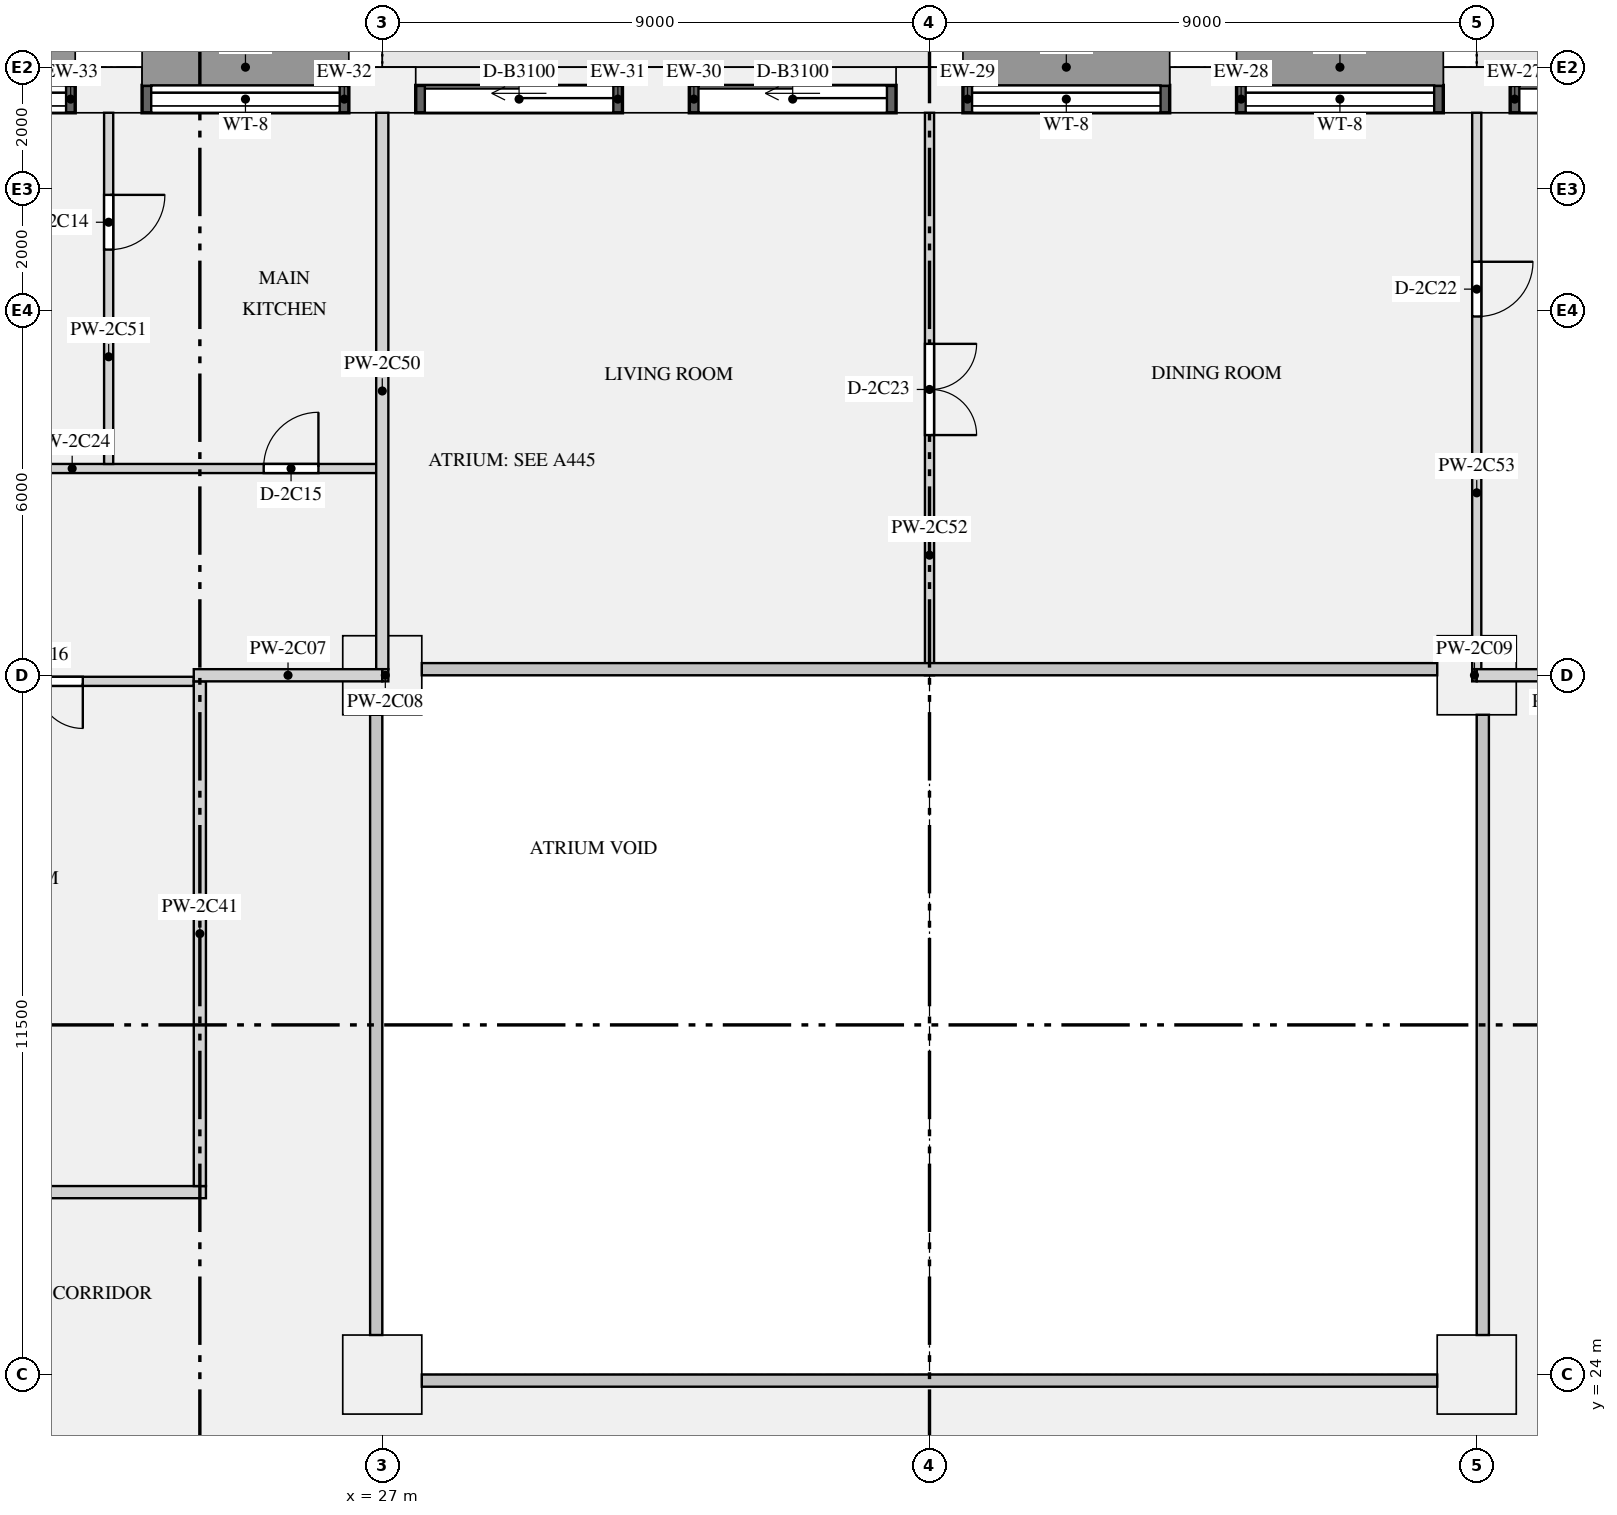
"""IFC4 building model, lengths in metres.
Left out: names, types, materials, properties, quantities, classifications, styles, units other than length and angle.
Written with IfcOpenShell. Run it as: python <this file> out.ifc"""

import sys

from ifc_helpers import new_model, si_unit, direction, frame, frame_2d, origin, origin_2d, place, context, subcontext, project, spatial, rectangle, extrude, element, fill, save


model = new_model("IFC4")
c1 = context("Model", 3, precision=1e-05, world=origin(), true_north=direction((0.0, 1.0)))
c2 = subcontext(c1, "Body", "Model", "MODEL_VIEW")
j1 = project(units=[si_unit("LENGTHUNIT", "METRE"), si_unit("PLANEANGLEUNIT", "RADIAN")], contexts=[c1])
p1 = place(None, origin())
s1 = spatial("IfcSite", under=j1, at=p1, CompositionType="ELEMENT")
p2 = place(p1, origin())
s2 = spatial("IfcBuilding", under=s1, at=p2, CompositionType="ELEMENT")
p3 = place(p2, frame((0.0, 0.0, 102.45)))
s3 = spatial("IfcBuildingStorey", under=s2, at=p3, CompositionType="ELEMENT", Elevation=102.45)
for number, where, z_axis, x_axis in (
    (1, (45.0, 45.125, 0.0), (0.0, 0.0, 1.0), (-1.0, 0.0, 0.0)),
    (2, (40.5, 45.125, 0.0), (0.0, 0.0, 1.0), (-1.0, 0.0, 0.0)),
    (3, (36.0, 45.125, 0.0), (0.0, 0.0, 1.0), (-1.0, 0.0, 0.0)),
    (4, (31.5, 45.125, 0.0), (0.0, 0.0, 1.0), (-1.0, 0.0, 0.0)),
    (5, (27.0, 45.125, 0.0), (0.0, 0.0, 1.0), (-1.0, 0.0, 0.0)),
    (6, (22.5, 45.125, 0.0), (0.0, 0.0, 1.0), (-1.0, 0.0, 0.0)),
):
    element("IfcColumn", number, at=place(p3, frame(where, z_axis=z_axis, x_axis=x_axis)), inside=s3, PredefinedType="USERDEFINED", context=c2, shape_type="SweptSolid", body=[
        extrude(rectangle(XDim=1.1, YDim=0.75, at=origin_2d()), origin(), (0.0, 0.0, 1.0), 3.15),
    ])
for number, where, z_axis, x_axis in (
    (7, (27.0, 24.0, 0.0), (0.0, 0.0, 1.0), (1.0, 0.0, 0.0)),
    (8, (45.0, 24.0, 0.0), (0.0, 0.0, 1.0), (1.0, 0.0, 0.0)),
    (9, (27.0, 35.5, 0.0), (0.0, 0.0, 1.0), (1.0, 0.0, 0.0)),
    (10, (45.0, 35.5, 0.0), (0.0, 0.0, 1.0), (1.0, 0.0, 0.0)),
):
    element("IfcColumn", number, at=place(p3, frame(where, z_axis=z_axis, x_axis=x_axis)), inside=s3, PredefinedType="COLUMN", context=c2, shape_type="SweptSolid", body=[
        extrude(rectangle(XDim=1.3, YDim=1.3, at=origin_2d()), origin(), (0.0, 0.0, 1.0), 3.15),
    ])
p4 = place(p3, frame((48.95, 44.975, 0.0), z_axis=(0.0, 0.0, 1.0), x_axis=(-1.0, 0.0, 0.0)))
e11 = element("IfcWall", 11, at=p4, inside=s3, PredefinedType="SOLIDWALL", context=c2, shape_type="SweptSolid", body=[
    extrude(rectangle(XDim=3.4, YDim=0.45, at=frame_2d((1.7, 0.0))), origin(), (0.0, 0.0, 1.0), 2.83),
])
p5 = place(p4, frame((0.15, 0.0, 0.0)))
e12 = element("IfcOpeningElement", 12, at=p5, cuts=e11, PredefinedType="OPENING", context=c2, shape_type="SweptSolid", body=[
    extrude(rectangle(XDim=3.1, YDim=2.3, at=frame_2d((1.55, 1.15))), frame((0.0, 0.235, 0.0), z_axis=(0.0, -1.0, 0.0), x_axis=(1.0, 0.0, 0.0)), (0.0, 0.0, 1.0), 0.47),
])
p6 = place(p3, frame((44.45, 44.975, 0.9), z_axis=(0.0, 0.0, 1.0), x_axis=(-1.0, 0.0, 0.0)))
e13 = element("IfcWall", 13, at=p6, inside=s3, PredefinedType="SOLIDWALL", context=c2, shape_type="SweptSolid", body=[
    extrude(rectangle(XDim=3.4, YDim=0.45, at=frame_2d((1.7, 0.0))), origin(), (0.0, 0.0, 1.0), 1.93),
])
p7 = place(p6, frame((0.15, 0.0, 0.15)))
e14 = element("IfcOpeningElement", 14, at=p7, cuts=e13, PredefinedType="OPENING", context=c2, shape_type="SweptSolid", body=[
    extrude(rectangle(XDim=3.1, YDim=1.5, at=frame_2d((1.55, 0.75))), frame((0.0, 0.235, 0.0), z_axis=(0.0, -1.0, 0.0), x_axis=(1.0, 0.0, 0.0)), (0.0, 0.0, 1.0), 0.47),
])
p8 = place(p3, frame((39.95, 44.975, 0.9), z_axis=(0.0, 0.0, 1.0), x_axis=(-1.0, 0.0, 0.0)))
e15 = element("IfcWall", 15, at=p8, inside=s3, PredefinedType="SOLIDWALL", context=c2, shape_type="SweptSolid", body=[
    extrude(rectangle(XDim=3.4, YDim=0.45, at=frame_2d((1.7, 0.0))), origin(), (0.0, 0.0, 1.0), 1.93),
])
p9 = place(p8, frame((0.15, 0.0, 0.15)))
e16 = element("IfcOpeningElement", 16, at=p9, cuts=e15, PredefinedType="OPENING", context=c2, shape_type="SweptSolid", body=[
    extrude(rectangle(XDim=3.1, YDim=1.5, at=frame_2d((1.55, 0.75))), frame((0.0, 0.235, 0.0), z_axis=(0.0, -1.0, 0.0), x_axis=(1.0, 0.0, 0.0)), (0.0, 0.0, 1.0), 0.47),
])
p10 = place(p3, frame((35.45, 44.975, 0.0), z_axis=(0.0, 0.0, 1.0), x_axis=(-1.0, 0.0, 0.0)))
e17 = element("IfcWall", 17, at=p10, inside=s3, PredefinedType="SOLIDWALL", context=c2, shape_type="SweptSolid", body=[
    extrude(rectangle(XDim=3.4, YDim=0.45, at=frame_2d((1.7, 0.0))), origin(), (0.0, 0.0, 1.0), 2.83),
])
p11 = place(p10, frame((0.15, 0.0, 0.0)))
e18 = element("IfcOpeningElement", 18, at=p11, cuts=e17, PredefinedType="OPENING", context=c2, shape_type="SweptSolid", body=[
    extrude(rectangle(XDim=3.1, YDim=2.3, at=frame_2d((1.55, 1.15))), frame((0.0, 0.235, 0.0), z_axis=(0.0, -1.0, 0.0), x_axis=(1.0, 0.0, 0.0)), (0.0, 0.0, 1.0), 0.47),
])
p12 = place(p3, frame((30.95, 44.975, 0.0), z_axis=(0.0, 0.0, 1.0), x_axis=(-1.0, 0.0, 0.0)))
e19 = element("IfcWall", 19, at=p12, inside=s3, PredefinedType="SOLIDWALL", context=c2, shape_type="SweptSolid", body=[
    extrude(rectangle(XDim=3.4, YDim=0.45, at=frame_2d((1.7, 0.0))), origin(), (0.0, 0.0, 1.0), 2.83),
])
p13 = place(p12, frame((0.15, 0.0, 0.0)))
e20 = element("IfcOpeningElement", 20, at=p13, cuts=e19, PredefinedType="OPENING", context=c2, shape_type="SweptSolid", body=[
    extrude(rectangle(XDim=3.1, YDim=2.3, at=frame_2d((1.55, 1.15))), frame((0.0, 0.235, 0.0), z_axis=(0.0, -1.0, 0.0), x_axis=(1.0, 0.0, 0.0)), (0.0, 0.0, 1.0), 0.47),
])
p14 = place(p3, frame((26.45, 44.975, 0.9), z_axis=(0.0, 0.0, 1.0), x_axis=(-1.0, 0.0, 0.0)))
e21 = element("IfcWall", 21, at=p14, inside=s3, PredefinedType="SOLIDWALL", context=c2, shape_type="SweptSolid", body=[
    extrude(rectangle(XDim=3.4, YDim=0.45, at=frame_2d((1.7, 0.0))), origin(), (0.0, 0.0, 1.0), 1.93),
])
p15 = place(p14, frame((0.15, 0.0, 0.15)))
e22 = element("IfcOpeningElement", 22, at=p15, cuts=e21, PredefinedType="OPENING", context=c2, shape_type="SweptSolid", body=[
    extrude(rectangle(XDim=3.1, YDim=1.5, at=frame_2d((1.55, 0.75))), frame((0.0, 0.235, 0.0), z_axis=(0.0, -1.0, 0.0), x_axis=(1.0, 0.0, 0.0)), (0.0, 0.0, 1.0), 0.47),
])
p16 = place(p3, frame((21.95, 44.975, 0.9), z_axis=(0.0, 0.0, 1.0), x_axis=(-1.0, 0.0, 0.0)))
e23 = element("IfcWall", 23, at=p16, inside=s3, PredefinedType="SOLIDWALL", context=c2, shape_type="SweptSolid", body=[
    extrude(rectangle(XDim=3.4, YDim=0.45, at=frame_2d((1.7, 0.0))), origin(), (0.0, 0.0, 1.0), 1.93),
])
p17 = place(p16, frame((0.15, 0.0, 0.15)))
e24 = element("IfcOpeningElement", 24, at=p17, cuts=e23, PredefinedType="OPENING", context=c2, shape_type="SweptSolid", body=[
    extrude(rectangle(XDim=3.1, YDim=1.5, at=frame_2d((1.55, 0.75))), frame((0.0, 0.235, 0.0), z_axis=(0.0, -1.0, 0.0), x_axis=(1.0, 0.0, 0.0)), (0.0, 0.0, 1.0), 0.47),
])
p18 = place(p3, frame((17.1, 27.0, 0.0), z_axis=(0.0, 0.0, 1.0), x_axis=(1.0, 0.0, 0.0)))
e25 = element("IfcWall", 25, at=p18, inside=s3, PredefinedType="PARTITIONING", context=c2, shape_type="SweptSolid", body=[
    extrude(rectangle(XDim=7.0, YDim=0.2, at=frame_2d((3.5, 0.0))), origin(), (0.0, 0.0, 1.0), 2.83),
])
p19 = place(p3, frame((23.9, 35.5, 0.0), z_axis=(0.0, 0.0, 1.0), x_axis=(1.0, 0.0, 0.0)))
e26 = element("IfcWall", 26, at=p19, inside=s3, PredefinedType="PARTITIONING", context=c2, shape_type="SweptSolid", body=[
    extrude(rectangle(XDim=3.1, YDim=0.2, at=frame_2d((1.55, 0.0))), origin(), (0.0, 0.0, 1.0), 2.83),
])
p20 = place(p3, frame((27.0, 35.5, 0.0), z_axis=(0.0, 0.0, 1.0), x_axis=(1.0, 0.0, 0.0)))
e27 = element("IfcWall", 27, at=p20, inside=s3, PredefinedType="PARTITIONING", context=c2, shape_type="SweptSolid", body=[
    extrude(rectangle(XDim=0.1, YDim=0.2, at=frame_2d((0.05, 0.0))), origin(), (0.0, 0.0, 1.0), 2.83),
])
p21 = place(p3, frame((44.925, 35.5, 0.0), z_axis=(0.0, 0.0, 1.0), x_axis=(1.0, 0.0, 0.0)))
e28 = element("IfcWall", 28, at=p21, inside=s3, PredefinedType="PARTITIONING", context=c2, shape_type="SweptSolid", body=[
    extrude(rectangle(XDim=0.075, YDim=0.2, at=frame_2d((0.038, 0.0))), origin(), (0.0, 0.0, 1.0), 2.83),
])
p22 = place(p3, frame((45.0, 35.5, 0.0), z_axis=(0.0, 0.0, 1.0), x_axis=(1.0, 0.0, 0.0)))
e29 = element("IfcWall", 29, at=p22, inside=s3, PredefinedType="PARTITIONING", context=c2, shape_type="SweptSolid", body=[
    extrude(rectangle(XDim=3.075, YDim=0.2, at=frame_2d((1.538, 0.0))), origin(), (0.0, 0.0, 1.0), 2.83),
])
p23 = place(p3, frame((13.425, 38.9, 0.0), z_axis=(0.0, 0.0, 1.0), x_axis=(1.0, 0.0, 0.0)))
e30 = element("IfcWall", 30, at=p23, inside=s3, PredefinedType="PARTITIONING", context=c2, shape_type="SweptSolid", body=[
    extrude(rectangle(XDim=13.475, YDim=0.15, at=frame_2d((6.737, 0.0))), origin(), (0.0, 0.0, 1.0), 2.83),
])
p24 = place(p23, frame((3.825, 0.0, 0.0)))
e31 = element("IfcOpeningElement", 31, at=p24, cuts=e30, PredefinedType="OPENING", context=c2, shape_type="SweptSolid", body=[
    extrude(rectangle(XDim=1.5, YDim=2.1, at=frame_2d((0.75, 1.05))), frame((0.0, 0.085, 0.0), z_axis=(0.0, -1.0, 0.0), x_axis=(1.0, 0.0, 0.0)), (0.0, 0.0, 1.0), 0.17),
])
p25 = place(p23, frame((11.625, 0.0, 0.0)))
e32 = element("IfcOpeningElement", 32, at=p25, cuts=e30, PredefinedType="OPENING", context=c2, shape_type="SweptSolid", body=[
    extrude(rectangle(XDim=0.9, YDim=2.1, at=frame_2d((0.45, 1.05))), frame((0.0, 0.085, 0.0), z_axis=(0.0, -1.0, 0.0), x_axis=(1.0, 0.0, 0.0)), (0.0, 0.0, 1.0), 0.17),
])
p26 = place(p3, frame((15.8, 35.4, 0.0), z_axis=(0.0, 0.0, 1.0), x_axis=(1.0, 0.0, 0.0)))
e33 = element("IfcWall", 33, at=p26, inside=s3, PredefinedType="PARTITIONING", context=c2, shape_type="SweptSolid", body=[
    extrude(rectangle(XDim=8.1, YDim=0.15, at=frame_2d((4.05, 0.0))), origin(), (0.0, 0.0, 1.0), 2.83),
])
p27 = place(p26, frame((4.775, 0.0, 0.0)))
e34 = element("IfcOpeningElement", 34, at=p27, cuts=e33, PredefinedType="OPENING", context=c2, shape_type="SweptSolid", body=[
    extrude(rectangle(XDim=1.5, YDim=2.1, at=frame_2d((0.75, 1.05))), frame((0.0, 0.085, 0.0), z_axis=(0.0, -1.0, 0.0), x_axis=(1.0, 0.0, 0.0)), (0.0, 0.0, 1.0), 0.17),
])
p28 = place(p3, frame((24.0, 27.1, 0.0), z_axis=(0.0, 0.0, 1.0), x_axis=(0.0, 1.0, 0.0)))
e35 = element("IfcWall", 35, at=p28, inside=s3, PredefinedType="PARTITIONING", context=c2, shape_type="SweptSolid", body=[
    extrude(rectangle(XDim=8.3, YDim=0.2, at=frame_2d((4.15, 0.0))), origin(), (0.0, 0.0, 1.0), 2.83),
])
p29 = place(p3, frame((27.0, 35.6, 0.0), z_axis=(0.0, 0.0, 1.0), x_axis=(0.0, 1.0, 0.0)))
e36 = element("IfcWall", 36, at=p29, inside=s3, PredefinedType="PARTITIONING", context=c2, shape_type="SweptSolid", body=[
    extrude(rectangle(XDim=9.15, YDim=0.2, at=frame_2d((4.575, 0.0))), origin(), (0.0, 0.0, 1.0), 2.83),
])
p30 = place(p3, frame((22.5, 38.975, 0.0), z_axis=(0.0, 0.0, 1.0), x_axis=(0.0, 1.0, 0.0)))
e37 = element("IfcWall", 37, at=p30, inside=s3, PredefinedType="PARTITIONING", context=c2, shape_type="SweptSolid", body=[
    extrude(rectangle(XDim=5.775, YDim=0.15, at=frame_2d((2.887, 0.0))), origin(), (0.0, 0.0, 1.0), 2.83),
])
p31 = place(p30, frame((3.525, 0.0, 0.0)))
e38 = element("IfcOpeningElement", 38, at=p31, cuts=e37, PredefinedType="OPENING", context=c2, shape_type="SweptSolid", body=[
    extrude(rectangle(XDim=0.9, YDim=2.1, at=frame_2d((0.45, 1.05))), frame((0.0, 0.085, 0.0), z_axis=(0.0, -1.0, 0.0), x_axis=(1.0, 0.0, 0.0)), (0.0, 0.0, 1.0), 0.17),
])
p32 = place(p3, frame((36.0, 35.5, 0.0), z_axis=(0.0, 0.0, 1.0), x_axis=(0.0, 1.0, 0.0)))
e39 = element("IfcWall", 39, at=p32, inside=s3, PredefinedType="PARTITIONING", context=c2, shape_type="SweptSolid", body=[
    extrude(rectangle(XDim=9.25, YDim=0.15, at=frame_2d((4.625, 0.0))), origin(), (0.0, 0.0, 1.0), 2.83),
])
p33 = place(p32, frame((3.95, 0.0, 0.0)))
e40 = element("IfcOpeningElement", 40, at=p33, cuts=e39, PredefinedType="OPENING", context=c2, shape_type="SweptSolid", body=[
    extrude(rectangle(XDim=1.5, YDim=2.1, at=frame_2d((0.75, 1.05))), frame((0.0, 0.085, 0.0), z_axis=(0.0, -1.0, 0.0), x_axis=(1.0, 0.0, 0.0)), (0.0, 0.0, 1.0), 0.17),
])
p34 = place(p3, frame((45.0, 35.6, 0.0), z_axis=(0.0, 0.0, 1.0), x_axis=(0.0, 1.0, 0.0)))
e41 = element("IfcWall", 41, at=p34, inside=s3, PredefinedType="PARTITIONING", context=c2, shape_type="SweptSolid", body=[
    extrude(rectangle(XDim=9.15, YDim=0.15, at=frame_2d((4.575, 0.0))), origin(), (0.0, 0.0, 1.0), 2.83),
])
p35 = place(p34, frame((5.8, 0.0, 0.0)))
e42 = element("IfcOpeningElement", 42, at=p35, cuts=e41, PredefinedType="OPENING", context=c2, shape_type="SweptSolid", body=[
    extrude(rectangle(XDim=0.9, YDim=2.1, at=frame_2d((0.45, 1.05))), frame((0.0, 0.085, 0.0), z_axis=(0.0, -1.0, 0.0), x_axis=(1.0, 0.0, 0.0)), (0.0, 0.0, 1.0), 0.17),
])
p36 = place(p5, origin())
e43 = element("IfcDoor", 43, at=p36, inside=s3, OperationType="SLIDING_TO_LEFT", PredefinedType="DOOR", context=c2, shape_type="SweptSolid", body=[
    extrude(rectangle(XDim=3.1, YDim=2.3, at=frame_2d((1.55, 1.15))), frame((0.0, -0.07, 0.0), z_axis=(0.0, -1.0, 0.0), x_axis=(1.0, 0.0, 0.0)), (0.0, 0.0, 1.0), 0.05),
])
fill(e12, e43)
p37 = place(p7, origin())
e44 = element("IfcWindow", 44, at=p37, inside=s3, PartitioningType="SINGLE_PANEL", PredefinedType="WINDOW", context=c2, shape_type="SweptSolid", body=[
    extrude(rectangle(XDim=3.1, YDim=1.5, at=frame_2d((1.55, 0.75))), frame((0.0, -0.065, 0.0), z_axis=(0.0, -1.0, 0.0), x_axis=(1.0, 0.0, 0.0)), (0.0, 0.0, 1.0), 0.06),
])
fill(e14, e44)
p38 = place(p9, origin())
e45 = element("IfcWindow", 45, at=p38, inside=s3, PartitioningType="SINGLE_PANEL", PredefinedType="WINDOW", context=c2, shape_type="SweptSolid", body=[
    extrude(rectangle(XDim=3.1, YDim=1.5, at=frame_2d((1.55, 0.75))), frame((0.0, -0.065, 0.0), z_axis=(0.0, -1.0, 0.0), x_axis=(1.0, 0.0, 0.0)), (0.0, 0.0, 1.0), 0.06),
])
fill(e16, e45)
p39 = place(p11, origin())
e46 = element("IfcDoor", 46, at=p39, inside=s3, OperationType="SLIDING_TO_LEFT", PredefinedType="DOOR", context=c2, shape_type="SweptSolid", body=[
    extrude(rectangle(XDim=3.1, YDim=2.3, at=frame_2d((1.55, 1.15))), frame((0.0, -0.07, 0.0), z_axis=(0.0, -1.0, 0.0), x_axis=(1.0, 0.0, 0.0)), (0.0, 0.0, 1.0), 0.05),
])
fill(e18, e46)
p40 = place(p13, origin())
e47 = element("IfcDoor", 47, at=p40, inside=s3, OperationType="SLIDING_TO_LEFT", PredefinedType="DOOR", context=c2, shape_type="SweptSolid", body=[
    extrude(rectangle(XDim=3.1, YDim=2.3, at=frame_2d((1.55, 1.15))), frame((0.0, -0.07, 0.0), z_axis=(0.0, -1.0, 0.0), x_axis=(1.0, 0.0, 0.0)), (0.0, 0.0, 1.0), 0.05),
])
fill(e20, e47)
p41 = place(p15, origin())
e48 = element("IfcWindow", 48, at=p41, inside=s3, PartitioningType="SINGLE_PANEL", PredefinedType="WINDOW", context=c2, shape_type="SweptSolid", body=[
    extrude(rectangle(XDim=3.1, YDim=1.5, at=frame_2d((1.55, 0.75))), frame((0.0, -0.065, 0.0), z_axis=(0.0, -1.0, 0.0), x_axis=(1.0, 0.0, 0.0)), (0.0, 0.0, 1.0), 0.06),
])
fill(e22, e48)
p42 = place(p17, origin())
e49 = element("IfcWindow", 49, at=p42, inside=s3, PartitioningType="SINGLE_PANEL", PredefinedType="WINDOW", context=c2, shape_type="SweptSolid", body=[
    extrude(rectangle(XDim=3.1, YDim=1.5, at=frame_2d((1.55, 0.75))), frame((0.0, -0.065, 0.0), z_axis=(0.0, -1.0, 0.0), x_axis=(1.0, 0.0, 0.0)), (0.0, 0.0, 1.0), 0.06),
])
fill(e24, e49)
p43 = place(p31, frame((0.9, 0.0, 0.0), z_axis=(0.0, 0.0, 1.0), x_axis=(-1.0, 0.0, 0.0)))
e50 = element("IfcDoor", 50, at=p43, inside=s3, OperationType="SINGLE_SWING_LEFT", PredefinedType="DOOR", context=c2, shape_type="SweptSolid", body=[
    extrude(rectangle(XDim=0.9, YDim=2.1, at=frame_2d((0.45, 1.05))), frame((0.0, 0.025, 0.0), z_axis=(0.0, -1.0, 0.0), x_axis=(1.0, 0.0, 0.0)), (0.0, 0.0, 1.0), 0.05),
])
fill(e38, e50)
p44 = place(p25, origin())
e51 = element("IfcDoor", 51, at=p44, inside=s3, OperationType="SINGLE_SWING_RIGHT", PredefinedType="DOOR", context=c2, shape_type="SweptSolid", body=[
    extrude(rectangle(XDim=0.9, YDim=2.1, at=frame_2d((0.45, 1.05))), frame((0.0, 0.025, 0.0), z_axis=(0.0, -1.0, 0.0), x_axis=(1.0, 0.0, 0.0)), (0.0, 0.0, 1.0), 0.05),
])
fill(e32, e51)
p45 = place(p27, frame((1.5, 0.0, 0.0), z_axis=(0.0, 0.0, 1.0), x_axis=(-1.0, 0.0, 0.0)))
e52 = element("IfcDoor", 52, at=p45, inside=s3, OperationType="DOUBLE_DOOR_SINGLE_SWING", PredefinedType="DOOR", context=c2, shape_type="SweptSolid", body=[
    extrude(rectangle(XDim=1.5, YDim=2.1, at=frame_2d((0.75, 1.05))), frame((0.0, 0.025, 0.0), z_axis=(0.0, -1.0, 0.0), x_axis=(1.0, 0.0, 0.0)), (0.0, 0.0, 1.0), 0.05),
])
fill(e34, e52)
p46 = place(p35, frame((0.9, 0.0, 0.0), z_axis=(0.0, 0.0, 1.0), x_axis=(-1.0, 0.0, 0.0)))
e53 = element("IfcDoor", 53, at=p46, inside=s3, OperationType="SINGLE_SWING_LEFT", PredefinedType="DOOR", context=c2, shape_type="SweptSolid", body=[
    extrude(rectangle(XDim=0.9, YDim=2.1, at=frame_2d((0.45, 1.05))), frame((0.0, 0.025, 0.0), z_axis=(0.0, -1.0, 0.0), x_axis=(1.0, 0.0, 0.0)), (0.0, 0.0, 1.0), 0.05),
])
fill(e42, e53)
p47 = place(p33, frame((1.5, 0.0, 0.0), z_axis=(0.0, 0.0, 1.0), x_axis=(-1.0, 0.0, 0.0)))
e54 = element("IfcDoor", 54, at=p47, inside=s3, OperationType="DOUBLE_DOOR_SINGLE_SWING", PredefinedType="DOOR", context=c2, shape_type="SweptSolid", body=[
    extrude(rectangle(XDim=1.5, YDim=2.1, at=frame_2d((0.75, 1.05))), frame((0.0, 0.025, 0.0), z_axis=(0.0, -1.0, 0.0), x_axis=(1.0, 0.0, 0.0)), (0.0, 0.0, 1.0), 0.05),
])
fill(e40, e54)
save(model, sys.argv[1])
